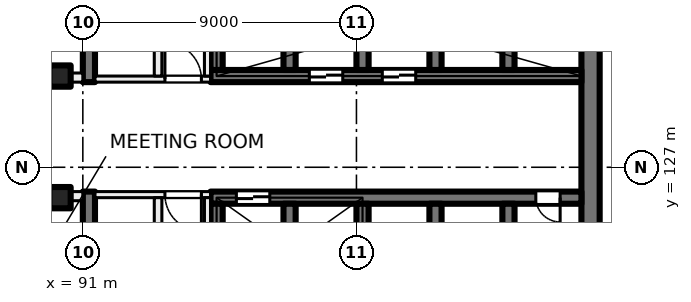
"""IFC4 building model, lengths in metres.
Left out: names, types, materials, properties, quantities, classifications, styles, units other than length and angle.
Written with IfcOpenShell. Run it as: python <this file> out.ifc"""

import sys

from ifc_helpers import new_model, si_unit, direction, frame, frame_2d, origin, origin_2d, place, context, subcontext, project, spatial, rectangle, extrude, element, fill, save


model = new_model("IFC4")
c1 = context("Model", 3, precision=1e-05, world=origin(), true_north=direction((0.0, 1.0)))
c2 = subcontext(c1, "Body", "Model", "MODEL_VIEW")
j1 = project(units=[si_unit("LENGTHUNIT", "METRE"), si_unit("PLANEANGLEUNIT", "RADIAN")], contexts=[c1])
p1 = place(None, origin())
s1 = spatial("IfcSite", under=j1, at=p1, CompositionType="ELEMENT")
p2 = place(p1, origin())
s2 = spatial("IfcBuilding", under=s1, at=p2, CompositionType="ELEMENT")
p3 = place(p2, frame((0.0, 0.0, 71.5)))
s3 = spatial("IfcBuildingStorey", under=s2, at=p3, CompositionType="ELEMENT", Elevation=71.5)
for number, where, z_axis, x_axis in (
    (1, (90.25, 130.0, 0.0), (0.0, 0.0, 1.0), (1.0, 0.0, 0.0)),
    (2, (90.25, 126.0, 0.0), (0.0, 0.0, 1.0), (1.0, 0.0, 0.0)),
):
    element("IfcColumn", number, at=place(p3, frame(where, z_axis=z_axis, x_axis=x_axis)), inside=s3, PredefinedType="COLUMN", context=c2, shape_type="SweptSolid", body=[
        extrude(rectangle(XDim=0.7, YDim=0.7, at=origin_2d()), origin(), (0.0, 0.0, 1.0), 4.0),
    ])
p4 = place(p3, frame((107.7, 135.2, 0.0), z_axis=(0.0, 0.0, 1.0), x_axis=(0.0, -1.0, 0.0)))
e3 = element("IfcWall", 3, at=p4, inside=s3, PredefinedType="SHEAR", context=c2, shape_type="SweptSolid", body=[
    extrude(rectangle(XDim=14.4, YDim=0.6, at=frame_2d((7.2, 0.0))), origin(), (0.0, 0.0, 1.0), 4.0),
])
p5 = place(p3, frame((107.4, 130.0, 0.0), z_axis=(0.0, 0.0, 1.0), x_axis=(-1.0, 0.0, 0.0)))
e4 = element("IfcWall", 4, at=p5, inside=s3, PredefinedType="SHEAR", context=c2, shape_type="SweptSolid", body=[
    extrude(rectangle(XDim=12.2, YDim=0.4, at=frame_2d((6.1, 0.0))), origin(), (0.0, 0.0, 1.0), 4.0),
])
p6 = place(p5, frame((5.45, 0.0, 0.0)))
e5 = element("IfcOpeningElement", 5, at=p6, cuts=e4, PredefinedType="OPENING", context=c2, shape_type="SweptSolid", body=[
    extrude(rectangle(XDim=1.1, YDim=2.1, at=frame_2d((0.55, 1.05))), frame((0.0, 0.21, 0.0), z_axis=(0.0, -1.0, 0.0), x_axis=(1.0, 0.0, 0.0)), (0.0, 0.0, 1.0), 0.42),
])
p7 = place(p5, frame((7.85, 0.0, 0.0)))
e6 = element("IfcOpeningElement", 6, at=p7, cuts=e4, PredefinedType="OPENING", context=c2, shape_type="SweptSolid", body=[
    extrude(rectangle(XDim=1.1, YDim=2.1, at=frame_2d((0.55, 1.05))), frame((0.0, 0.21, 0.0), z_axis=(0.0, -1.0, 0.0), x_axis=(1.0, 0.0, 0.0)), (0.0, 0.0, 1.0), 0.42),
])
for number, where, z_axis, x_axis in (
    (7, (105.0, 133.2, 0.0), (0.0, 0.0, 1.0), (0.0, -1.0, 0.0)),
    (8, (102.6, 133.2, 0.0), (0.0, 0.0, 1.0), (0.0, -1.0, 0.0)),
    (9, (100.2, 133.2, 0.0), (0.0, 0.0, 1.0), (0.0, -1.0, 0.0)),
    (10, (97.8, 133.2, 0.0), (0.0, 0.0, 1.0), (0.0, -1.0, 0.0)),
    (11, (95.4, 133.2, 0.0), (0.0, 0.0, 1.0), (0.0, -1.0, 0.0)),
):
    element("IfcWall", number, at=place(p3, frame(where, z_axis=z_axis, x_axis=x_axis)), inside=s3, PredefinedType="SHEAR", context=c2, shape_type="SweptSolid", body=[
        extrude(rectangle(XDim=3.0, YDim=0.4, at=frame_2d((1.5, 0.0))), origin(), (0.0, 0.0, 1.0), 4.0),
    ])
p8 = place(p3, frame((107.4, 126.0, 0.0), z_axis=(0.0, 0.0, 1.0), x_axis=(-1.0, 0.0, 0.0)))
e12 = element("IfcWall", 12, at=p8, inside=s3, PredefinedType="SHEAR", context=c2, shape_type="SweptSolid", body=[
    extrude(rectangle(XDim=12.2, YDim=0.4, at=frame_2d((6.1, 0.0))), origin(), (0.0, 0.0, 1.0), 4.0),
])
p9 = place(p8, frame((10.25, 0.0, 0.0)))
e13 = element("IfcOpeningElement", 13, at=p9, cuts=e12, PredefinedType="OPENING", context=c2, shape_type="SweptSolid", body=[
    extrude(rectangle(XDim=1.1, YDim=2.1, at=frame_2d((0.55, 1.05))), frame((0.0, 0.21, 0.0), z_axis=(0.0, -1.0, 0.0), x_axis=(1.0, 0.0, 0.0)), (0.0, 0.0, 1.0), 0.42),
])
p10 = place(p8, frame((0.7, 0.0, 0.0)))
e14 = element("IfcOpeningElement", 14, at=p10, cuts=e12, PredefinedType="OPENING", context=c2, shape_type="SweptSolid", body=[
    extrude(rectangle(XDim=0.8, YDim=2.1, at=frame_2d((0.4, 1.05))), frame((0.0, 0.21, 0.0), z_axis=(0.0, -1.0, 0.0), x_axis=(1.0, 0.0, 0.0)), (0.0, 0.0, 1.0), 0.42),
])
for number, where, z_axis, x_axis in (
    (15, (105.0, 125.8, 0.0), (0.0, 0.0, 1.0), (0.0, -1.0, 0.0)),
    (16, (102.6, 125.8, 0.0), (0.0, 0.0, 1.0), (0.0, -1.0, 0.0)),
    (17, (100.2, 125.8, 0.0), (0.0, 0.0, 1.0), (0.0, -1.0, 0.0)),
    (18, (97.8, 125.8, 0.0), (0.0, 0.0, 1.0), (0.0, -1.0, 0.0)),
    (19, (95.4, 125.8, 0.0), (0.0, 0.0, 1.0), (0.0, -1.0, 0.0)),
):
    element("IfcWall", number, at=place(p3, frame(where, z_axis=z_axis, x_axis=x_axis)), inside=s3, PredefinedType="SHEAR", context=c2, shape_type="SweptSolid", body=[
        extrude(rectangle(XDim=3.0, YDim=0.4, at=frame_2d((1.5, 0.0))), origin(), (0.0, 0.0, 1.0), 4.0),
    ])
for number, where, z_axis, x_axis in (
    (20, (91.2, 138.4, 0.0), (0.0, 0.0, 1.0), (0.0, -1.0, 0.0)),
    (21, (91.2, 126.2, 0.0), (0.0, 0.0, 1.0), (0.0, -1.0, 0.0)),
):
    element("IfcWall", number, at=place(p3, frame(where, z_axis=z_axis, x_axis=x_axis)), inside=s3, PredefinedType="SHEAR", context=c2, shape_type="SweptSolid", body=[
        extrude(rectangle(XDim=8.6, YDim=0.4, at=frame_2d((4.3, 0.0))), origin(), (0.0, 0.0, 1.0), 4.0),
    ])
p11 = place(p3, frame((95.2, 126.1, 0.0), z_axis=(0.0, 0.0, 1.0), x_axis=(-1.0, 0.0, 0.0)))
e22 = element("IfcWall", 22, at=p11, inside=s3, PredefinedType="PARTITIONING", context=c2, shape_type="SweptSolid", body=[
    extrude(rectangle(XDim=3.8, YDim=0.2, at=frame_2d((1.9, 0.0))), origin(), (0.0, 0.0, 1.0), 3.625),
])
p12 = place(p11, frame((0.3, 0.0, 0.0)))
e23 = element("IfcOpeningElement", 23, at=p12, cuts=e22, PredefinedType="OPENING", context=c2, shape_type="SweptSolid", body=[
    extrude(rectangle(XDim=1.2, YDim=2.1, at=frame_2d((0.6, 1.05))), frame((0.0, 0.11, 0.0), z_axis=(0.0, -1.0, 0.0), x_axis=(1.0, 0.0, 0.0)), (0.0, 0.0, 1.0), 0.22),
])
p13 = place(p3, frame((95.1, 117.6, 0.0), z_axis=(0.0, 0.0, 1.0), x_axis=(0.0, 1.0, 0.0)))
e24 = element("IfcWall", 24, at=p13, inside=s3, PredefinedType="PARTITIONING", context=c2, shape_type="SweptSolid", body=[
    extrude(rectangle(XDim=8.4, YDim=0.2, at=frame_2d((4.2, 0.0))), origin(), (0.0, 0.0, 1.0), 3.625),
])
p14 = place(p13, frame((1.65, 0.0, 0.0)))
e25 = element("IfcOpeningElement", 25, at=p14, cuts=e24, PredefinedType="OPENING", context=c2, shape_type="SweptSolid", body=[
    extrude(rectangle(XDim=1.5, YDim=2.1, at=frame_2d((0.75, 1.05))), frame((0.0, 0.11, 0.0), z_axis=(0.0, -1.0, 0.0), x_axis=(1.0, 0.0, 0.0)), (0.0, 0.0, 1.0), 0.22),
])
p15 = place(p3, frame((93.475, 117.6, 0.0), z_axis=(0.0, 0.0, 1.0), x_axis=(0.0, 1.0, 0.0)))
e26 = element("IfcWall", 26, at=p15, inside=s3, PredefinedType="PARTITIONING", context=c2, shape_type="SweptSolid", body=[
    extrude(rectangle(XDim=8.4, YDim=0.25, at=frame_2d((4.2, 0.0))), origin(), (0.0, 0.0, 1.0), 3.625),
])
p16 = place(p15, frame((6.625, 0.0, 0.0)))
e27 = element("IfcOpeningElement", 27, at=p16, cuts=e26, PredefinedType="OPENING", context=c2, shape_type="SweptSolid", body=[
    extrude(rectangle(XDim=0.8, YDim=2.1, at=frame_2d((0.4, 1.05))), frame((0.0, 0.135, 0.0), z_axis=(0.0, -1.0, 0.0), x_axis=(1.0, 0.0, 0.0)), (0.0, 0.0, 1.0), 0.27),
])
p17 = place(p15, frame((2.375, 0.0, 0.0)))
e28 = element("IfcOpeningElement", 28, at=p17, cuts=e26, PredefinedType="OPENING", context=c2, shape_type="SweptSolid", body=[
    extrude(rectangle(XDim=0.8, YDim=2.1, at=frame_2d((0.4, 1.05))), frame((0.0, 0.135, 0.0), z_axis=(0.0, -1.0, 0.0), x_axis=(1.0, 0.0, 0.0)), (0.0, 0.0, 1.0), 0.27),
])
p18 = place(p3, frame((91.4, 129.9, 0.0), z_axis=(0.0, 0.0, 1.0), x_axis=(1.0, 0.0, 0.0)))
e29 = element("IfcWall", 29, at=p18, inside=s3, PredefinedType="PARTITIONING", context=c2, shape_type="SweptSolid", body=[
    extrude(rectangle(XDim=3.8, YDim=0.2, at=frame_2d((1.9, 0.0))), origin(), (0.0, 0.0, 1.0), 3.625),
])
p19 = place(p18, frame((2.3, 0.0, 0.0)))
e30 = element("IfcOpeningElement", 30, at=p19, cuts=e29, PredefinedType="OPENING", context=c2, shape_type="SweptSolid", body=[
    extrude(rectangle(XDim=1.2, YDim=2.1, at=frame_2d((0.6, 1.05))), frame((0.0, 0.11, 0.0), z_axis=(0.0, -1.0, 0.0), x_axis=(1.0, 0.0, 0.0)), (0.0, 0.0, 1.0), 0.22),
])
p20 = place(p3, frame((95.1, 130.0, 0.0), z_axis=(0.0, 0.0, 1.0), x_axis=(0.0, 1.0, 0.0)))
e31 = element("IfcWall", 31, at=p20, inside=s3, PredefinedType="PARTITIONING", context=c2, shape_type="SweptSolid", body=[
    extrude(rectangle(XDim=8.4, YDim=0.2, at=frame_2d((4.2, 0.0))), origin(), (0.0, 0.0, 1.0), 3.625),
])
p21 = place(p20, frame((5.25, 0.0, 0.0)))
e32 = element("IfcOpeningElement", 32, at=p21, cuts=e31, PredefinedType="OPENING", context=c2, shape_type="SweptSolid", body=[
    extrude(rectangle(XDim=1.5, YDim=2.1, at=frame_2d((0.75, 1.05))), frame((0.0, 0.11, 0.0), z_axis=(0.0, -1.0, 0.0), x_axis=(1.0, 0.0, 0.0)), (0.0, 0.0, 1.0), 0.22),
])
p22 = place(p3, frame((93.475, 130.0, 0.0), z_axis=(0.0, 0.0, 1.0), x_axis=(0.0, 1.0, 0.0)))
e33 = element("IfcWall", 33, at=p22, inside=s3, PredefinedType="PARTITIONING", context=c2, shape_type="SweptSolid", body=[
    extrude(rectangle(XDim=8.4, YDim=0.25, at=frame_2d((4.2, 0.0))), origin(), (0.0, 0.0, 1.0), 3.625),
])
p23 = place(p22, frame((0.975, 0.0, 0.0)))
e34 = element("IfcOpeningElement", 34, at=p23, cuts=e33, PredefinedType="OPENING", context=c2, shape_type="SweptSolid", body=[
    extrude(rectangle(XDim=0.8, YDim=2.1, at=frame_2d((0.4, 1.05))), frame((0.0, 0.135, 0.0), z_axis=(0.0, -1.0, 0.0), x_axis=(1.0, 0.0, 0.0)), (0.0, 0.0, 1.0), 0.27),
])
p24 = place(p22, frame((5.225, 0.0, 0.0)))
e35 = element("IfcOpeningElement", 35, at=p24, cuts=e33, PredefinedType="OPENING", context=c2, shape_type="SweptSolid", body=[
    extrude(rectangle(XDim=0.8, YDim=2.1, at=frame_2d((0.4, 1.05))), frame((0.0, 0.135, 0.0), z_axis=(0.0, -1.0, 0.0), x_axis=(1.0, 0.0, 0.0)), (0.0, 0.0, 1.0), 0.27),
])
p25 = place(p3, frame((72.5, 129.95, 0.0), z_axis=(0.0, 0.0, 1.0), x_axis=(1.0, 0.0, 0.0)))
e36 = element("IfcWall", 36, at=p25, inside=s3, PredefinedType="PARTITIONING", context=c2, shape_type="SweptSolid", body=[
    extrude(rectangle(XDim=18.5, YDim=0.3, at=frame_2d((9.25, 0.0))), origin(), (0.0, 0.0, 1.0), 3.625),
])
p26 = place(p25, frame((14.375, 0.0, 0.0)))
e37 = element("IfcOpeningElement", 37, at=p26, cuts=e36, PredefinedType="OPENING", context=c2, shape_type="SweptSolid", body=[
    extrude(rectangle(XDim=1.0, YDim=2.1, at=frame_2d((0.5, 1.05))), frame((0.0, 0.16, 0.0), z_axis=(0.0, -1.0, 0.0), x_axis=(1.0, 0.0, 0.0)), (0.0, 0.0, 1.0), 0.32),
])
p27 = place(p25, frame((3.475, 0.0, 0.0)))
e38 = element("IfcOpeningElement", 38, at=p27, cuts=e36, PredefinedType="OPENING", context=c2, shape_type="SweptSolid", body=[
    extrude(rectangle(XDim=1.8, YDim=2.1, at=frame_2d((0.9, 1.05))), frame((0.0, 0.16, 0.0), z_axis=(0.0, -1.0, 0.0), x_axis=(1.0, 0.0, 0.0)), (0.0, 0.0, 1.0), 0.32),
])
p28 = place(p3, frame((91.0, 126.05, 0.0), z_axis=(0.0, 0.0, 1.0), x_axis=(-1.0, 0.0, 0.0)))
e39 = element("IfcWall", 39, at=p28, inside=s3, PredefinedType="PARTITIONING", context=c2, shape_type="SweptSolid", body=[
    extrude(rectangle(XDim=43.785, YDim=0.3, at=frame_2d((21.893, 0.0))), origin(), (0.0, 0.0, 1.0), 3.625),
])
p29 = place(p28, frame((2.025, 0.0, 0.0)))
e40 = element("IfcOpeningElement", 40, at=p29, cuts=e39, PredefinedType="OPENING", context=c2, shape_type="SweptSolid", body=[
    extrude(rectangle(XDim=1.2, YDim=2.1, at=frame_2d((0.6, 1.05))), frame((0.0, 0.16, 0.0), z_axis=(0.0, -1.0, 0.0), x_axis=(1.0, 0.0, 0.0)), (0.0, 0.0, 1.0), 0.32),
])
p30 = place(p28, frame((7.0, 0.0, 0.0)))
e41 = element("IfcOpeningElement", 41, at=p30, cuts=e39, PredefinedType="OPENING", context=c2, shape_type="SweptSolid", body=[
    extrude(rectangle(XDim=1.0, YDim=2.1, at=frame_2d((0.5, 1.05))), frame((0.0, 0.16, 0.0), z_axis=(0.0, -1.0, 0.0), x_axis=(1.0, 0.0, 0.0)), (0.0, 0.0, 1.0), 0.32),
])
p31 = place(p28, frame((11.5, 0.0, 0.0)))
e42 = element("IfcOpeningElement", 42, at=p31, cuts=e39, PredefinedType="OPENING", context=c2, shape_type="SweptSolid", body=[
    extrude(rectangle(XDim=1.0, YDim=2.1, at=frame_2d((0.5, 1.05))), frame((0.0, 0.16, 0.0), z_axis=(0.0, -1.0, 0.0), x_axis=(1.0, 0.0, 0.0)), (0.0, 0.0, 1.0), 0.32),
])
p32 = place(p28, frame((16.0, 0.0, 0.0)))
e43 = element("IfcOpeningElement", 43, at=p32, cuts=e39, PredefinedType="OPENING", context=c2, shape_type="SweptSolid", body=[
    extrude(rectangle(XDim=1.0, YDim=2.1, at=frame_2d((0.5, 1.05))), frame((0.0, 0.16, 0.0), z_axis=(0.0, -1.0, 0.0), x_axis=(1.0, 0.0, 0.0)), (0.0, 0.0, 1.0), 0.32),
])
p33 = place(p28, frame((20.5, 0.0, 0.0)))
e44 = element("IfcOpeningElement", 44, at=p33, cuts=e39, PredefinedType="OPENING", context=c2, shape_type="SweptSolid", body=[
    extrude(rectangle(XDim=1.0, YDim=2.1, at=frame_2d((0.5, 1.05))), frame((0.0, 0.16, 0.0), z_axis=(0.0, -1.0, 0.0), x_axis=(1.0, 0.0, 0.0)), (0.0, 0.0, 1.0), 0.32),
])
p34 = place(p28, frame((39.296, 0.0, 0.0)))
e45 = element("IfcOpeningElement", 45, at=p34, cuts=e39, PredefinedType="OPENING", context=c2, shape_type="SweptSolid", body=[
    extrude(rectangle(XDim=1.8, YDim=2.1, at=frame_2d((0.9, 1.05))), frame((0.0, 0.16, 0.0), z_axis=(0.0, -1.0, 0.0), x_axis=(1.0, 0.0, 0.0)), (0.0, 0.0, 1.0), 0.32),
])
p35 = place(p9, origin())
e46 = element("IfcDoor", 46, at=p35, inside=s3, OperationType="DOUBLE_DOOR_SLIDING", PredefinedType="DOOR", context=c2, shape_type="SweptSolid", body=[
    extrude(rectangle(XDim=1.1, YDim=2.1, at=frame_2d((0.55, 1.05))), frame((0.0, 0.025, 0.0), z_axis=(0.0, -1.0, 0.0), x_axis=(1.0, 0.0, 0.0)), (0.0, 0.0, 1.0), 0.05),
])
fill(e13, e46)
p36 = place(p6, origin())
e47 = element("IfcDoor", 47, at=p36, inside=s3, OperationType="DOUBLE_DOOR_SLIDING", PredefinedType="DOOR", context=c2, shape_type="SweptSolid", body=[
    extrude(rectangle(XDim=1.1, YDim=2.1, at=frame_2d((0.55, 1.05))), frame((0.0, 0.025, 0.0), z_axis=(0.0, -1.0, 0.0), x_axis=(1.0, 0.0, 0.0)), (0.0, 0.0, 1.0), 0.05),
])
fill(e5, e47)
p37 = place(p7, origin())
e48 = element("IfcDoor", 48, at=p37, inside=s3, OperationType="DOUBLE_DOOR_SLIDING", PredefinedType="DOOR", context=c2, shape_type="SweptSolid", body=[
    extrude(rectangle(XDim=1.1, YDim=2.1, at=frame_2d((0.55, 1.05))), frame((0.0, 0.025, 0.0), z_axis=(0.0, -1.0, 0.0), x_axis=(1.0, 0.0, 0.0)), (0.0, 0.0, 1.0), 0.05),
])
fill(e6, e48)
p38 = place(p10, origin())
e49 = element("IfcDoor", 49, at=p38, inside=s3, OperationType="SINGLE_SWING_LEFT", PredefinedType="DOOR", context=c2, shape_type="SweptSolid", body=[
    extrude(rectangle(XDim=0.8, YDim=2.1, at=frame_2d((0.4, 1.05))), frame((0.0, 0.025, 0.0), z_axis=(0.0, -1.0, 0.0), x_axis=(1.0, 0.0, 0.0)), (0.0, 0.0, 1.0), 0.05),
])
fill(e14, e49)
p39 = place(p12, origin())
e50 = element("IfcDoor", 50, at=p39, inside=s3, OperationType="DOUBLE_DOOR_SINGLE_SWING", PredefinedType="DOOR", context=c2, shape_type="SweptSolid", body=[
    extrude(rectangle(XDim=1.2, YDim=2.1, at=frame_2d((0.6, 1.05))), frame((0.0, 0.025, 0.0), z_axis=(0.0, -1.0, 0.0), x_axis=(1.0, 0.0, 0.0)), (0.0, 0.0, 1.0), 0.05),
])
fill(e23, e50)
p40 = place(p19, origin())
e51 = element("IfcDoor", 51, at=p40, inside=s3, OperationType="DOUBLE_DOOR_SINGLE_SWING", PredefinedType="DOOR", context=c2, shape_type="SweptSolid", body=[
    extrude(rectangle(XDim=1.2, YDim=2.1, at=frame_2d((0.6, 1.05))), frame((0.0, 0.025, 0.0), z_axis=(0.0, -1.0, 0.0), x_axis=(1.0, 0.0, 0.0)), (0.0, 0.0, 1.0), 0.05),
])
fill(e30, e51)
save(model, sys.argv[1])
